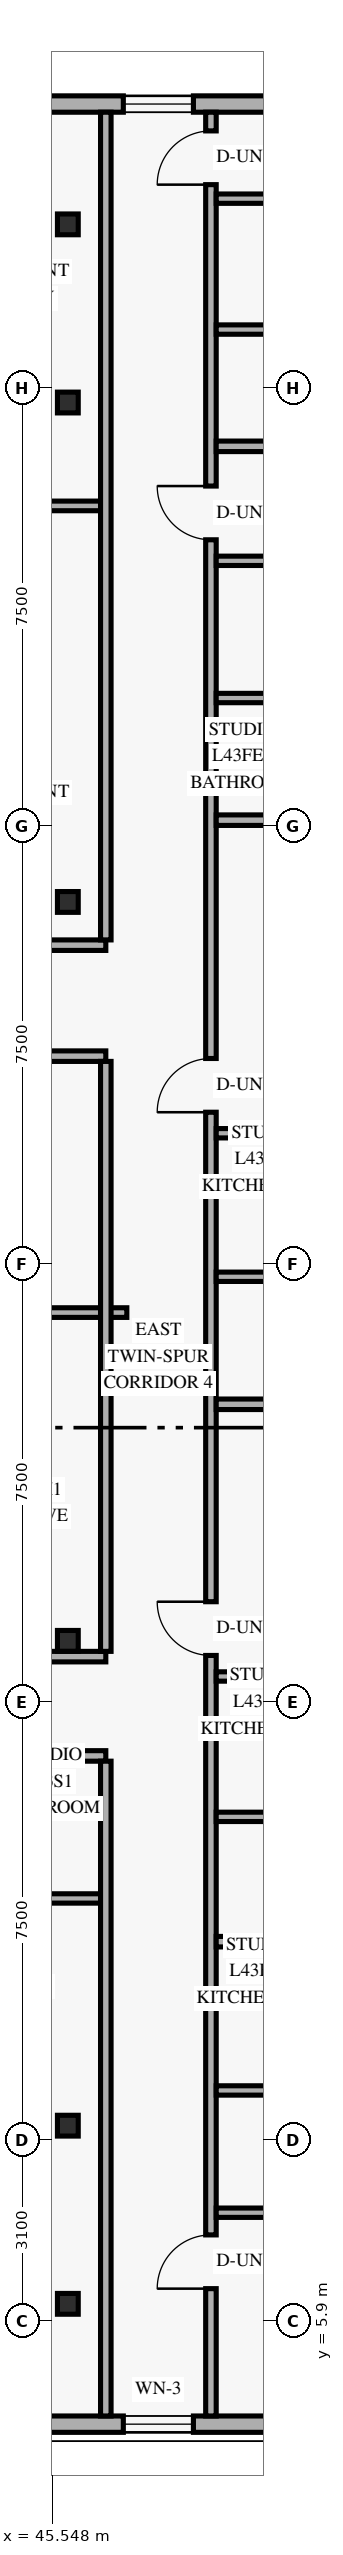
"""IFC4 building model, lengths in metres.
Left out: names, types, materials, properties, quantities, classifications, styles, units other than length and angle.
Written with IfcOpenShell. Run it as: python <this file> out.ifc"""

import sys

from ifc_helpers import new_model, si_unit, direction, frame, frame_2d, origin, origin_2d, place, context, subcontext, project, spatial, rectangle, hollow_rectangle, extrude, element, fill, save


model = new_model("IFC4")
c1 = context("Model", 3, precision=1e-05, world=origin(), true_north=direction((0.0, 1.0)))
c2 = subcontext(c1, "Body", "Model", "MODEL_VIEW")
j1 = project(units=[si_unit("LENGTHUNIT", "METRE"), si_unit("PLANEANGLEUNIT", "RADIAN")], contexts=[c1])
p1 = place(None, origin())
s1 = spatial("IfcSite", under=j1, at=p1, CompositionType="ELEMENT")
p2 = place(p1, origin())
s2 = spatial("IfcBuilding", under=s1, at=p2, CompositionType="ELEMENT")
p3 = place(p2, frame((0.0, 0.0, 166.2)))
s3 = spatial("IfcBuildingStorey", under=s2, at=p3, CompositionType="ELEMENT", Elevation=166.2)
for number, where, z_axis, x_axis in (
    (1, (45.753, 6.2, 0.0), (0.035, 0.0, 0.999), (0.0, 1.0, 0.0)),
    (2, (45.753, 9.25, 0.0), (0.035, 0.0, 0.999), (0.0, 1.0, 0.0)),
    (3, (45.753, 17.55, 0.0), (0.035, 0.0, 0.999), (0.0, 1.0, 0.0)),
    (4, (45.753, 30.2, 0.0), (0.035, 0.0, 0.999), (0.0, 1.0, 0.0)),
    (5, (45.753, 38.75, 0.0), (0.035, 0.0, 0.999), (0.0, 1.0, 0.0)),
    (6, (45.753, 41.8, 0.0), (0.035, 0.0, 0.999), (0.0, 1.0, 0.0)),
):
    element("IfcColumn", number, at=place(p3, frame(where, z_axis=z_axis, x_axis=x_axis)), inside=s3, PredefinedType="COLUMN", context=c2, shape_type="SweptSolid", body=[
        extrude(hollow_rectangle(XDim=0.356, YDim=0.356, WallThickness=0.016, at=origin_2d()), origin(), (0.0, 0.0, 1.0), 3.602),
    ])
p4 = place(p3, frame((21.22, 4.14, 0.0), z_axis=(0.0, 0.0, 1.0), x_axis=(1.0, 0.0, 0.0)))
e7 = element("IfcWall", 7, at=p4, inside=s3, PredefinedType="SOLIDWALL", context=c2, shape_type="SweptSolid", body=[
    extrude(rectangle(XDim=33.76, YDim=0.28, at=frame_2d((16.88, 0.0))), origin(), (0.0, 0.0, 1.0), 3.36),
])
p5 = place(p4, frame((2.255, 0.0, 0.85)))
e8 = element("IfcOpeningElement", 8, at=p5, cuts=e7, PredefinedType="OPENING", context=c2, shape_type="SweptSolid", body=[
    extrude(rectangle(XDim=1.8, YDim=1.6, at=frame_2d((0.9, 0.8))), frame((0.0, 0.15, 0.0), z_axis=(0.0, -1.0, 0.0), x_axis=(1.0, 0.0, 0.0)), (0.0, 0.0, 1.0), 0.3),
])
p6 = place(p4, frame((9.14, 0.0, 0.85)))
e9 = element("IfcOpeningElement", 9, at=p6, cuts=e7, PredefinedType="OPENING", context=c2, shape_type="SweptSolid", body=[
    extrude(rectangle(XDim=1.8, YDim=1.6, at=frame_2d((0.9, 0.8))), frame((0.0, 0.15, 0.0), z_axis=(0.0, -1.0, 0.0), x_axis=(1.0, 0.0, 0.0)), (0.0, 0.0, 1.0), 0.3),
])
p7 = place(p4, frame((14.565, 0.0, 0.85)))
e10 = element("IfcOpeningElement", 10, at=p7, cuts=e7, PredefinedType="OPENING", context=c2, shape_type="SweptSolid", body=[
    extrude(rectangle(XDim=1.8, YDim=1.6, at=frame_2d((0.9, 0.8))), frame((0.0, 0.15, 0.0), z_axis=(0.0, -1.0, 0.0), x_axis=(1.0, 0.0, 0.0)), (0.0, 0.0, 1.0), 0.3),
])
p8 = place(p4, frame((20.088, 0.0, 0.85)))
e11 = element("IfcOpeningElement", 11, at=p8, cuts=e7, PredefinedType="OPENING", context=c2, shape_type="SweptSolid", body=[
    extrude(rectangle(XDim=1.8, YDim=1.6, at=frame_2d((0.9, 0.8))), frame((0.0, 0.15, 0.0), z_axis=(0.0, -1.0, 0.0), x_axis=(1.0, 0.0, 0.0)), (0.0, 0.0, 1.0), 0.3),
])
p9 = place(p4, frame((25.546, 0.0, 0.85)))
e12 = element("IfcOpeningElement", 12, at=p9, cuts=e7, PredefinedType="OPENING", context=c2, shape_type="SweptSolid", body=[
    extrude(rectangle(XDim=1.2, YDim=1.5, at=frame_2d((0.6, 0.75))), frame((0.0, 0.15, 0.0), z_axis=(0.0, -1.0, 0.0), x_axis=(1.0, 0.0, 0.0)), (0.0, 0.0, 1.0), 0.3),
])
p10 = place(p4, frame((29.503, 0.0, 0.85)))
e13 = element("IfcOpeningElement", 13, at=p10, cuts=e7, PredefinedType="OPENING", context=c2, shape_type="SweptSolid", body=[
    extrude(rectangle(XDim=1.8, YDim=1.6, at=frame_2d((0.9, 0.8))), frame((0.0, 0.15, 0.0), z_axis=(0.0, -1.0, 0.0), x_axis=(1.0, 0.0, 0.0)), (0.0, 0.0, 1.0), 0.3),
])
p11 = place(p3, frame((54.98, 43.86, 0.0), z_axis=(0.0, 0.0, 1.0), x_axis=(-1.0, 0.0, 0.0)))
e14 = element("IfcWall", 14, at=p11, inside=s3, PredefinedType="SOLIDWALL", context=c2, shape_type="SweptSolid", body=[
    extrude(rectangle(XDim=33.76, YDim=0.28, at=frame_2d((16.88, 0.0))), origin(), (0.0, 0.0, 1.0), 3.36),
])
p12 = place(p11, frame((28.055, 0.0, 0.85)))
e15 = element("IfcOpeningElement", 15, at=p12, cuts=e14, PredefinedType="OPENING", context=c2, shape_type="SweptSolid", body=[
    extrude(rectangle(XDim=1.8, YDim=1.6, at=frame_2d((0.9, 0.8))), frame((0.0, 0.15, 0.0), z_axis=(0.0, -1.0, 0.0), x_axis=(1.0, 0.0, 0.0)), (0.0, 0.0, 1.0), 0.3),
])
p13 = place(p11, frame((21.17, 0.0, 0.85)))
e16 = element("IfcOpeningElement", 16, at=p13, cuts=e14, PredefinedType="OPENING", context=c2, shape_type="SweptSolid", body=[
    extrude(rectangle(XDim=1.8, YDim=1.6, at=frame_2d((0.9, 0.8))), frame((0.0, 0.15, 0.0), z_axis=(0.0, -1.0, 0.0), x_axis=(1.0, 0.0, 0.0)), (0.0, 0.0, 1.0), 0.3),
])
p14 = place(p11, frame((15.207, 0.0, 0.85)))
e17 = element("IfcOpeningElement", 17, at=p14, cuts=e14, PredefinedType="OPENING", context=c2, shape_type="SweptSolid", body=[
    extrude(rectangle(XDim=1.8, YDim=1.6, at=frame_2d((0.9, 0.8))), frame((0.0, 0.15, 0.0), z_axis=(0.0, -1.0, 0.0), x_axis=(1.0, 0.0, 0.0)), (0.0, 0.0, 1.0), 0.3),
])
p15 = place(p11, frame((9.684, 0.0, 0.85)))
e18 = element("IfcOpeningElement", 18, at=p15, cuts=e14, PredefinedType="OPENING", context=c2, shape_type="SweptSolid", body=[
    extrude(rectangle(XDim=1.8, YDim=1.6, at=frame_2d((0.9, 0.8))), frame((0.0, 0.15, 0.0), z_axis=(0.0, -1.0, 0.0), x_axis=(1.0, 0.0, 0.0)), (0.0, 0.0, 1.0), 0.3),
])
p16 = place(p11, frame((7.014, 0.0, 0.85)))
e19 = element("IfcOpeningElement", 19, at=p16, cuts=e14, PredefinedType="OPENING", context=c2, shape_type="SweptSolid", body=[
    extrude(rectangle(XDim=1.2, YDim=1.5, at=frame_2d((0.6, 0.75))), frame((0.0, 0.15, 0.0), z_axis=(0.0, -1.0, 0.0), x_axis=(1.0, 0.0, 0.0)), (0.0, 0.0, 1.0), 0.3),
])
p17 = place(p11, frame((2.457, 0.0, 0.85)))
e20 = element("IfcOpeningElement", 20, at=p17, cuts=e14, PredefinedType="OPENING", context=c2, shape_type="SweptSolid", body=[
    extrude(rectangle(XDim=1.8, YDim=1.6, at=frame_2d((0.9, 0.8))), frame((0.0, 0.15, 0.0), z_axis=(0.0, -1.0, 0.0), x_axis=(1.0, 0.0, 0.0)), (0.0, 0.0, 1.0), 0.3),
])
p18 = place(p3, frame((38.032, 15.58, 0.0), z_axis=(0.0, 0.0, 1.0), x_axis=(1.0, 0.0, 0.0)))
e21 = element("IfcWall", 21, at=p18, inside=s3, PredefinedType="STANDARD", context=c2, shape_type="SweptSolid", body=[
    extrude(rectangle(XDim=8.434, YDim=0.18, at=frame_2d((4.217, 0.0))), origin(), (0.0, 0.0, 1.0), 2.73),
])
p19 = place(p18, frame((0.357, 0.0, 0.0)))
e22 = element("IfcOpeningElement", 22, at=p19, cuts=e21, PredefinedType="OPENING", context=c2, shape_type="SweptSolid", body=[
    extrude(rectangle(XDim=0.92, YDim=2.15, at=frame_2d((0.46, 1.075))), frame((0.0, 0.1, 0.0), z_axis=(0.0, -1.0, 0.0), x_axis=(1.0, 0.0, 0.0)), (0.0, 0.0, 1.0), 0.2),
])
for number, where, z_axis, x_axis in (
    (23, (37.64, 17.28, 0.0), (0.0, 0.0, 1.0), (1.0, 0.0, 0.0)),
    (24, (37.64, 27.56, 0.0), (0.0, 0.0, 1.0), (1.0, 0.0, 0.0)),
):
    element("IfcWall", number, at=place(p3, frame(where, z_axis=z_axis, x_axis=x_axis)), inside=s3, PredefinedType="STANDARD", context=c2, shape_type="SweptSolid", body=[
        extrude(rectangle(XDim=8.826, YDim=0.18, at=frame_2d((4.413, 0.0))), origin(), (0.0, 0.0, 1.0), 2.73),
    ])
p20 = place(p3, frame((35.51, 29.46, 0.0), z_axis=(0.0, 0.0, 1.0), x_axis=(1.0, 0.0, 0.0)))
e25 = element("IfcWall", 25, at=p20, inside=s3, PredefinedType="STANDARD", context=c2, shape_type="SweptSolid", body=[
    extrude(rectangle(XDim=10.956, YDim=0.18, at=frame_2d((5.478, 0.0))), origin(), (0.0, 0.0, 1.0), 2.73),
])
p21 = place(p20, frame((0.32, 0.0, 0.0)))
e26 = element("IfcOpeningElement", 26, at=p21, cuts=e25, PredefinedType="OPENING", context=c2, shape_type="SweptSolid", body=[
    extrude(rectangle(XDim=0.92, YDim=2.15, at=frame_2d((0.46, 1.075))), frame((0.0, 0.1, 0.0), z_axis=(0.0, -1.0, 0.0), x_axis=(1.0, 0.0, 0.0)), (0.0, 0.0, 1.0), 0.2),
])
p22 = place(p3, frame((41.796, 13.14, 0.0), z_axis=(0.0, 0.0, 1.0), x_axis=(1.0, 0.0, 0.0)))
e27 = element("IfcWall", 27, at=p22, inside=s3, PredefinedType="PLUMBINGWALL", context=c2, shape_type="SweptSolid", body=[
    extrude(rectangle(XDim=4.67, YDim=0.16, at=frame_2d((2.335, 0.0))), origin(), (0.0, 0.0, 1.0), 2.73),
])
p23 = place(p22, frame((0.35, 0.0, 0.0)))
e28 = element("IfcOpeningElement", 28, at=p23, cuts=e27, PredefinedType="OPENING", context=c2, shape_type="SweptSolid", body=[
    extrude(rectangle(XDim=0.88, YDim=2.12, at=frame_2d((0.44, 1.06))), frame((0.0, 0.09, 0.0), z_axis=(0.0, -1.0, 0.0), x_axis=(1.0, 0.0, 0.0)), (0.0, 0.0, 1.0), 0.18),
])
p24 = place(p22, frame((2.72, 0.0, 0.0)))
e29 = element("IfcOpeningElement", 29, at=p24, cuts=e27, PredefinedType="OPENING", context=c2, shape_type="SweptSolid", body=[
    extrude(rectangle(XDim=0.86, YDim=2.12, at=frame_2d((0.43, 1.06))), frame((0.0, 0.09, 0.0), z_axis=(0.0, -1.0, 0.0), x_axis=(1.0, 0.0, 0.0)), (0.0, 0.0, 1.0), 0.18),
])
p25 = place(p3, frame((42.406, 36.98, 0.0), z_axis=(0.0, 0.0, 1.0), x_axis=(1.0, 0.0, 0.0)))
e30 = element("IfcWall", 30, at=p25, inside=s3, PredefinedType="PARTITIONING", context=c2, shape_type="SweptSolid", body=[
    extrude(rectangle(XDim=3.97, YDim=0.165, at=frame_2d((1.985, 0.0))), origin(), (0.0, 0.0, 1.0), 2.73),
])
p26 = place(p3, frame((42.696, 23.17, 0.0), z_axis=(0.0, 0.0, 1.0), x_axis=(1.0, 0.0, 0.0)))
e31 = element("IfcWall", 31, at=p26, inside=s3, PredefinedType="PARTITIONING", context=c2, shape_type="SweptSolid", body=[
    extrude(rectangle(XDim=4.13, YDim=0.165, at=frame_2d((2.065, 0.0))), origin(), (0.0, 0.0, 1.0), 2.73),
])
p27 = place(p26, frame((0.55, 0.0, 0.0)))
e32 = element("IfcOpeningElement", 32, at=p27, cuts=e31, PredefinedType="OPENING", context=c2, shape_type="SweptSolid", body=[
    extrude(rectangle(XDim=0.88, YDim=2.12, at=frame_2d((0.44, 1.06))), frame((0.0, 0.093, 0.0), z_axis=(0.0, -1.0, 0.0), x_axis=(1.0, 0.0, 0.0)), (0.0, 0.0, 1.0), 0.185),
])
p28 = place(p3, frame((48.266, 4.28, 0.0), z_axis=(0.0, 0.0, 1.0), x_axis=(0.0, 1.0, 0.0)))
e33 = element("IfcWall", 33, at=p28, inside=s3, PredefinedType="STANDARD", context=c2, shape_type="SweptSolid", body=[
    extrude(rectangle(XDim=39.44, YDim=0.18, at=frame_2d((19.72, 0.0))), origin(), (0.0, 0.0, 1.0), 2.73),
])
p29 = place(p28, frame((2.18, 0.0, 0.0)))
e34 = element("IfcOpeningElement", 34, at=p29, cuts=e33, PredefinedType="OPENING", context=c2, shape_type="SweptSolid", body=[
    extrude(rectangle(XDim=0.92, YDim=2.15, at=frame_2d((0.46, 1.075))), frame((0.0, 0.1, 0.0), z_axis=(0.0, -1.0, 0.0), x_axis=(1.0, 0.0, 0.0)), (0.0, 0.0, 1.0), 0.2),
])
p30 = place(p28, frame((13.02, 0.0, 0.0)))
e35 = element("IfcOpeningElement", 35, at=p30, cuts=e33, PredefinedType="OPENING", context=c2, shape_type="SweptSolid", body=[
    extrude(rectangle(XDim=0.92, YDim=2.15, at=frame_2d((0.46, 1.075))), frame((0.0, 0.1, 0.0), z_axis=(0.0, -1.0, 0.0), x_axis=(1.0, 0.0, 0.0)), (0.0, 0.0, 1.0), 0.2),
])
p31 = place(p28, frame((22.32, 0.0, 0.0)))
e36 = element("IfcOpeningElement", 36, at=p31, cuts=e33, PredefinedType="OPENING", context=c2, shape_type="SweptSolid", body=[
    extrude(rectangle(XDim=0.92, YDim=2.15, at=frame_2d((0.46, 1.075))), frame((0.0, 0.1, 0.0), z_axis=(0.0, -1.0, 0.0), x_axis=(1.0, 0.0, 0.0)), (0.0, 0.0, 1.0), 0.2),
])
p32 = place(p28, frame((32.12, 0.0, 0.0)))
e37 = element("IfcOpeningElement", 37, at=p32, cuts=e33, PredefinedType="OPENING", context=c2, shape_type="SweptSolid", body=[
    extrude(rectangle(XDim=0.92, YDim=2.15, at=frame_2d((0.46, 1.075))), frame((0.0, 0.1, 0.0), z_axis=(0.0, -1.0, 0.0), x_axis=(1.0, 0.0, 0.0)), (0.0, 0.0, 1.0), 0.2),
])
p33 = place(p28, frame((38.2, 0.0, 0.0)))
e38 = element("IfcOpeningElement", 38, at=p33, cuts=e33, PredefinedType="OPENING", context=c2, shape_type="SweptSolid", body=[
    extrude(rectangle(XDim=0.92, YDim=2.15, at=frame_2d((0.46, 1.075))), frame((0.0, 0.1, 0.0), z_axis=(0.0, -1.0, 0.0), x_axis=(1.0, 0.0, 0.0)), (0.0, 0.0, 1.0), 0.2),
])
p34 = place(p3, frame((46.466, 4.28, 0.0), z_axis=(0.0, 0.0, 1.0), x_axis=(0.0, 1.0, 0.0)))
e39 = element("IfcWall", 39, at=p34, inside=s3, PredefinedType="STANDARD", context=c2, shape_type="SweptSolid", body=[
    extrude(rectangle(XDim=11.21, YDim=0.18, at=frame_2d((5.605, 0.0))), origin(), (0.0, 0.0, 1.0), 2.73),
])
p35 = place(p3, frame((46.466, 17.37, 0.0), z_axis=(0.0, 0.0, 1.0), x_axis=(0.0, 1.0, 0.0)))
e40 = element("IfcWall", 40, at=p35, inside=s3, PredefinedType="STANDARD", context=c2, shape_type="SweptSolid", body=[
    extrude(rectangle(XDim=10.1, YDim=0.18, at=frame_2d((5.05, 0.0))), origin(), (0.0, 0.0, 1.0), 2.73),
])
p36 = place(p3, frame((46.466, 29.55, 0.0), z_axis=(0.0, 0.0, 1.0), x_axis=(0.0, 1.0, 0.0)))
e41 = element("IfcWall", 41, at=p36, inside=s3, PredefinedType="STANDARD", context=c2, shape_type="SweptSolid", body=[
    extrude(rectangle(XDim=14.17, YDim=0.18, at=frame_2d((7.085, 0.0))), origin(), (0.0, 0.0, 1.0), 2.73),
])
p37 = place(p3, frame((48.356, 7.76, 0.0), z_axis=(0.0, 0.0, 1.0), x_axis=(1.0, 0.0, 0.0)))
e42 = element("IfcWall", 42, at=p37, inside=s3, PredefinedType="PLUMBINGWALL", context=c2, shape_type="SweptSolid", body=[
    extrude(rectangle(XDim=2.33, YDim=0.16, at=frame_2d((1.165, 0.0))), origin(), (0.0, 0.0, 1.0), 3.36),
])
p38 = place(p3, frame((48.356, 9.853, 0.0), z_axis=(0.0, 0.0, 1.0), x_axis=(1.0, 0.0, 0.0)))
e43 = element("IfcWall", 43, at=p38, inside=s3, PredefinedType="PLUMBINGWALL", context=c2, shape_type="SweptSolid", body=[
    extrude(rectangle(XDim=2.17, YDim=0.16, at=frame_2d((1.085, 0.0))), origin(), (0.0, 0.0, 1.0), 3.36),
])
p39 = place(p3, frame((48.356, 12.4, 0.0), z_axis=(0.0, 0.0, 1.0), x_axis=(1.0, 0.0, 0.0)))
e44 = element("IfcWall", 44, at=p39, inside=s3, PredefinedType="PARTITIONING", context=c2, shape_type="SweptSolid", body=[
    extrude(rectangle(XDim=9.964, YDim=0.18, at=frame_2d((4.982, 0.0))), origin(), (0.0, 0.0, 1.0), 2.879),
])
p40 = place(p3, frame((48.356, 16.94, 0.0), z_axis=(0.0, 0.0, 1.0), x_axis=(1.0, 0.0, 0.0)))
e45 = element("IfcWall", 45, at=p40, inside=s3, PredefinedType="PLUMBINGWALL", context=c2, shape_type="SweptSolid", body=[
    extrude(rectangle(XDim=2.53, YDim=0.16, at=frame_2d((1.265, 0.0))), origin(), (0.0, 0.0, 1.0), 3.36),
])
p41 = place(p3, frame((48.356, 14.537, 0.0), z_axis=(0.0, 0.0, 1.0), x_axis=(1.0, 0.0, 0.0)))
e46 = element("IfcWall", 46, at=p41, inside=s3, PredefinedType="PLUMBINGWALL", context=c2, shape_type="SweptSolid", body=[
    extrude(rectangle(XDim=2.37, YDim=0.16, at=frame_2d((1.185, 0.0))), origin(), (0.0, 0.0, 1.0), 3.36),
])
p42 = place(p3, frame((48.356, 21.6, 0.0), z_axis=(0.0, 0.0, 1.0), x_axis=(1.0, 0.0, 0.0)))
e47 = element("IfcWall", 47, at=p42, inside=s3, PredefinedType="PARTITIONING", context=c2, shape_type="SweptSolid", body=[
    extrude(rectangle(XDim=9.964, YDim=0.18, at=frame_2d((4.982, 0.0))), origin(), (0.0, 0.0, 1.0), 2.879),
])
p43 = place(p3, frame((48.356, 26.24, 0.0), z_axis=(0.0, 0.0, 1.0), x_axis=(1.0, 0.0, 0.0)))
e48 = element("IfcWall", 48, at=p43, inside=s3, PredefinedType="PLUMBINGWALL", context=c2, shape_type="SweptSolid", body=[
    extrude(rectangle(XDim=2.606, YDim=0.16, at=frame_2d((1.303, 0.0))), origin(), (0.0, 0.0, 1.0), 3.36),
])
p44 = place(p3, frame((48.356, 23.783, 0.0), z_axis=(0.0, 0.0, 1.0), x_axis=(1.0, 0.0, 0.0)))
e49 = element("IfcWall", 49, at=p44, inside=s3, PredefinedType="PLUMBINGWALL", context=c2, shape_type="SweptSolid", body=[
    extrude(rectangle(XDim=2.446, YDim=0.16, at=frame_2d((1.223, 0.0))), origin(), (0.0, 0.0, 1.0), 3.36),
])
p45 = place(p3, frame((48.356, 31.6, 0.0), z_axis=(0.0, 0.0, 1.0), x_axis=(1.0, 0.0, 0.0)))
e50 = element("IfcWall", 50, at=p45, inside=s3, PredefinedType="PARTITIONING", context=c2, shape_type="SweptSolid", body=[
    extrude(rectangle(XDim=9.964, YDim=0.18, at=frame_2d((4.982, 0.0))), origin(), (0.0, 0.0, 1.0), 2.879),
])
p46 = place(p3, frame((48.356, 36.04, 0.0), z_axis=(0.0, 0.0, 1.0), x_axis=(1.0, 0.0, 0.0)))
e51 = element("IfcWall", 51, at=p46, inside=s3, PredefinedType="PLUMBINGWALL", context=c2, shape_type="SweptSolid", body=[
    extrude(rectangle(XDim=2.682, YDim=0.16, at=frame_2d((1.341, 0.0))), origin(), (0.0, 0.0, 1.0), 3.36),
])
p47 = place(p3, frame((48.356, 33.691, 0.0), z_axis=(0.0, 0.0, 1.0), x_axis=(1.0, 0.0, 0.0)))
e52 = element("IfcWall", 52, at=p47, inside=s3, PredefinedType="PLUMBINGWALL", context=c2, shape_type="SweptSolid", body=[
    extrude(rectangle(XDim=2.522, YDim=0.16, at=frame_2d((1.261, 0.0))), origin(), (0.0, 0.0, 1.0), 3.36),
])
p48 = place(p3, frame((48.356, 38.0, 0.0), z_axis=(0.0, 0.0, 1.0), x_axis=(1.0, 0.0, 0.0)))
e53 = element("IfcWall", 53, at=p48, inside=s3, PredefinedType="PARTITIONING", context=c2, shape_type="SweptSolid", body=[
    extrude(rectangle(XDim=9.964, YDim=0.18, at=frame_2d((4.982, 0.0))), origin(), (0.0, 0.0, 1.0), 2.879),
])
p49 = place(p3, frame((48.356, 42.24, 0.0), z_axis=(0.0, 0.0, 1.0), x_axis=(1.0, 0.0, 0.0)))
e54 = element("IfcWall", 54, at=p49, inside=s3, PredefinedType="PLUMBINGWALL", context=c2, shape_type="SweptSolid", body=[
    extrude(rectangle(XDim=2.33, YDim=0.16, at=frame_2d((1.165, 0.0))), origin(), (0.0, 0.0, 1.0), 3.36),
])
p50 = place(p3, frame((48.356, 39.999, 0.0), z_axis=(0.0, 0.0, 1.0), x_axis=(1.0, 0.0, 0.0)))
e55 = element("IfcWall", 55, at=p50, inside=s3, PredefinedType="PLUMBINGWALL", context=c2, shape_type="SweptSolid", body=[
    extrude(rectangle(XDim=2.17, YDim=0.16, at=frame_2d((1.085, 0.0))), origin(), (0.0, 0.0, 1.0), 3.36),
])
p51 = place(p9, origin())
e56 = element("IfcWindow", 56, at=p51, inside=s3, PartitioningType="SINGLE_PANEL", PredefinedType="WINDOW", context=c2, shape_type="SweptSolid", body=[
    extrude(rectangle(XDim=1.2, YDim=1.5, at=frame_2d((0.6, 0.75))), frame((0.0, 0.03, 0.0), z_axis=(0.0, -1.0, 0.0), x_axis=(1.0, 0.0, 0.0)), (0.0, 0.0, 1.0), 0.06),
])
fill(e12, e56)
p52 = place(p16, origin())
e57 = element("IfcWindow", 57, at=p52, inside=s3, PartitioningType="SINGLE_PANEL", PredefinedType="WINDOW", context=c2, shape_type="SweptSolid", body=[
    extrude(rectangle(XDim=1.2, YDim=1.5, at=frame_2d((0.6, 0.75))), frame((0.0, 0.03, 0.0), z_axis=(0.0, -1.0, 0.0), x_axis=(1.0, 0.0, 0.0)), (0.0, 0.0, 1.0), 0.06),
])
fill(e19, e57)
p53 = place(p29, origin())
e58 = element("IfcDoor", 58, at=p53, inside=s3, OperationType="SINGLE_SWING_LEFT", PredefinedType="DOOR", context=c2, shape_type="SweptSolid", body=[
    extrude(rectangle(XDim=0.92, YDim=2.15, at=frame_2d((0.46, 1.075))), frame((0.0, 0.025, 0.0), z_axis=(0.0, -1.0, 0.0), x_axis=(1.0, 0.0, 0.0)), (0.0, 0.0, 1.0), 0.05),
])
fill(e34, e58)
p54 = place(p30, origin())
e59 = element("IfcDoor", 59, at=p54, inside=s3, OperationType="SINGLE_SWING_RIGHT", PredefinedType="DOOR", context=c2, shape_type="SweptSolid", body=[
    extrude(rectangle(XDim=0.92, YDim=2.15, at=frame_2d((0.46, 1.075))), frame((0.0, 0.025, 0.0), z_axis=(0.0, -1.0, 0.0), x_axis=(1.0, 0.0, 0.0)), (0.0, 0.0, 1.0), 0.05),
])
fill(e35, e59)
p55 = place(p31, origin())
e60 = element("IfcDoor", 60, at=p55, inside=s3, OperationType="SINGLE_SWING_LEFT", PredefinedType="DOOR", context=c2, shape_type="SweptSolid", body=[
    extrude(rectangle(XDim=0.92, YDim=2.15, at=frame_2d((0.46, 1.075))), frame((0.0, 0.025, 0.0), z_axis=(0.0, -1.0, 0.0), x_axis=(1.0, 0.0, 0.0)), (0.0, 0.0, 1.0), 0.05),
])
fill(e36, e60)
p56 = place(p32, origin())
e61 = element("IfcDoor", 61, at=p56, inside=s3, OperationType="SINGLE_SWING_RIGHT", PredefinedType="DOOR", context=c2, shape_type="SweptSolid", body=[
    extrude(rectangle(XDim=0.92, YDim=2.15, at=frame_2d((0.46, 1.075))), frame((0.0, 0.025, 0.0), z_axis=(0.0, -1.0, 0.0), x_axis=(1.0, 0.0, 0.0)), (0.0, 0.0, 1.0), 0.05),
])
fill(e37, e61)
p57 = place(p33, origin())
e62 = element("IfcDoor", 62, at=p57, inside=s3, OperationType="SINGLE_SWING_LEFT", PredefinedType="DOOR", context=c2, shape_type="SweptSolid", body=[
    extrude(rectangle(XDim=0.92, YDim=2.15, at=frame_2d((0.46, 1.075))), frame((0.0, 0.025, 0.0), z_axis=(0.0, -1.0, 0.0), x_axis=(1.0, 0.0, 0.0)), (0.0, 0.0, 1.0), 0.05),
])
fill(e38, e62)
save(model, sys.argv[1])
